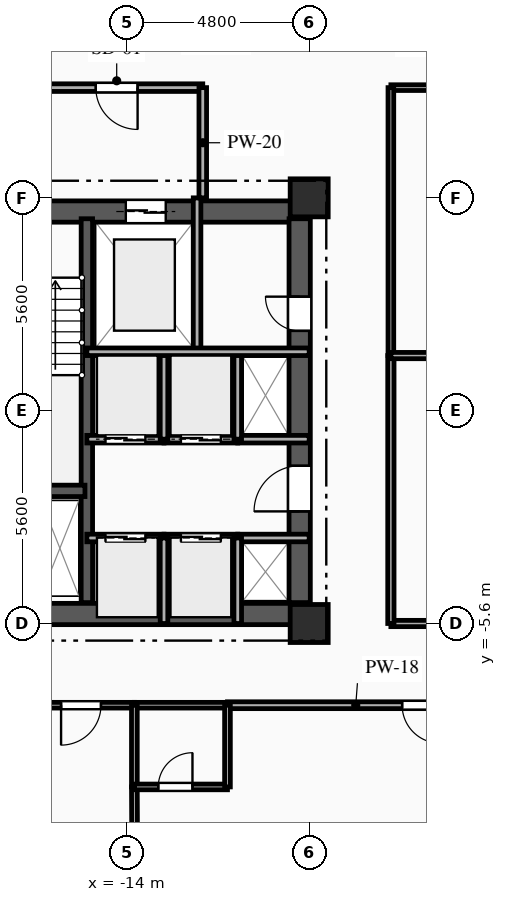
"""IFC4 building model, lengths in metres.
Left out: names, types, materials, properties, quantities, classifications, styles, units other than length and angle.
Written with IfcOpenShell. Run it as: python <this file> out.ifc"""

import sys

from ifc_helpers import new_model, si_unit, direction, frame, frame_2d, origin, origin_2d, place, context, subcontext, project, spatial, rectangle, extrude, element, fill, save


model = new_model("IFC4")
c1 = context("Model", 3, precision=1e-05, world=origin(), true_north=direction((0.0, 1.0)))
c2 = subcontext(c1, "Body", "Model", "MODEL_VIEW")
j1 = project(units=[si_unit("LENGTHUNIT", "METRE"), si_unit("PLANEANGLEUNIT", "RADIAN")], contexts=[c1])
p1 = place(None, origin())
s1 = spatial("IfcSite", under=j1, at=p1, CompositionType="ELEMENT")
p2 = place(p1, origin())
s2 = spatial("IfcBuilding", under=s1, at=p2, CompositionType="ELEMENT")
p3 = place(p2, frame((0.0, 0.0, 79.0)))
s3 = spatial("IfcBuildingStorey", under=s2, at=p3, CompositionType="ELEMENT", Elevation=79.0)
for number, where, z_axis, x_axis in (
    (1, (-9.2, -5.6, 0.0), (0.0, 0.0, 1.0), (1.0, 0.0, 0.0)),
    (2, (-9.2, 5.6, 0.0), (0.0, 0.0, 1.0), (1.0, 0.0, 0.0)),
):
    element("IfcColumn", number, at=place(p3, frame(where, z_axis=z_axis, x_axis=x_axis)), inside=s3, PredefinedType="COLUMN", context=c2, shape_type="SweptSolid", body=[
        extrude(rectangle(XDim=1.0, YDim=1.0, at=origin_2d()), origin(), (0.0, 0.0, 1.0), 3.35),
    ])
p4 = place(p3, frame((-18.8, 5.24, 0.0), z_axis=(0.0, 0.0, 1.0), x_axis=(1.0, 0.0, 0.0)))
e3 = element("IfcWall", 3, at=p4, inside=s3, PredefinedType="SHEAR", context=c2, shape_type="SweptSolid", body=[
    extrude(rectangle(XDim=9.6, YDim=0.56, at=frame_2d((4.8, 0.0))), origin(), (0.0, 0.0, 1.0), 3.045),
])
p5 = place(p4, frame((1.55, 0.0, 0.0)))
e4 = element("IfcOpeningElement", 4, at=p5, cuts=e3, PredefinedType="OPENING", context=c2, shape_type="SweptSolid", body=[
    extrude(rectangle(XDim=1.1, YDim=2.15, at=frame_2d((0.55, 1.075))), frame((0.0, 0.29, 0.0), z_axis=(0.0, -1.0, 0.0), x_axis=(1.0, 0.0, 0.0)), (0.0, 0.0, 1.0), 0.58),
])
p6 = place(p4, frame((4.775, 0.0, 0.0)))
e5 = element("IfcOpeningElement", 5, at=p6, cuts=e3, PredefinedType="OPENING", context=c2, shape_type="SweptSolid", body=[
    extrude(rectangle(XDim=1.05, YDim=2.1, at=frame_2d((0.525, 1.05))), frame((0.0, 0.29, 0.0), z_axis=(0.0, -1.0, 0.0), x_axis=(1.0, 0.0, 0.0)), (0.0, 0.0, 1.0), 0.58),
])
p7 = place(p3, frame((-18.8, -5.35, 0.0), z_axis=(0.0, 0.0, 1.0), x_axis=(1.0, 0.0, 0.0)))
e6 = element("IfcWall", 6, at=p7, inside=s3, PredefinedType="SHEAR", context=c2, shape_type="SweptSolid", body=[
    extrude(rectangle(XDim=9.6, YDim=0.56, at=frame_2d((4.8, 0.0))), origin(), (0.0, 0.0, 1.0), 3.045),
])
p8 = place(p7, frame((1.05, 0.0, 0.0)))
e7 = element("IfcOpeningElement", 7, at=p8, cuts=e6, PredefinedType="OPENING", context=c2, shape_type="SweptSolid", body=[
    extrude(rectangle(XDim=0.9, YDim=2.1, at=frame_2d((0.45, 1.05))), frame((0.0, 0.29, 0.0), z_axis=(0.0, -1.0, 0.0), x_axis=(1.0, 0.0, 0.0)), (0.0, 0.0, 1.0), 0.58),
])
p9 = place(p3, frame((-9.45, -5.05, 0.0), z_axis=(0.0, 0.0, 1.0), x_axis=(0.0, 1.0, 0.0)))
e8 = element("IfcWall", 8, at=p9, inside=s3, PredefinedType="SHEAR", context=c2, shape_type="SweptSolid", body=[
    extrude(rectangle(XDim=10.1, YDim=0.56, at=frame_2d((5.05, 0.0))), origin(), (0.0, 0.0, 1.0), 3.045),
])
p10 = place(p9, frame((7.15, 0.0, 0.0)))
e9 = element("IfcOpeningElement", 9, at=p10, cuts=e8, PredefinedType="OPENING", context=c2, shape_type="SweptSolid", body=[
    extrude(rectangle(XDim=0.9, YDim=2.1, at=frame_2d((0.45, 1.05))), frame((0.0, 0.29, 0.0), z_axis=(0.0, -1.0, 0.0), x_axis=(1.0, 0.0, 0.0)), (0.0, 0.0, 1.0), 0.58),
])
p11 = place(p9, frame((2.4, 0.0, 0.0)))
e10 = element("IfcOpeningElement", 10, at=p11, cuts=e8, PredefinedType="OPENING", context=c2, shape_type="SweptSolid", body=[
    extrude(rectangle(XDim=1.2, YDim=2.15, at=frame_2d((0.6, 1.075))), frame((0.0, 0.29, 0.0), z_axis=(0.0, -1.0, 0.0), x_axis=(1.0, 0.0, 0.0)), (0.0, 0.0, 1.0), 0.58),
])
p12 = place(p3, frame((-15.05, -5.05, 0.0), z_axis=(0.0, 0.0, 1.0), x_axis=(0.0, 1.0, 0.0)))
e11 = element("IfcWall", 11, at=p12, inside=s3, PredefinedType="SHEAR", context=c2, shape_type="SweptSolid", body=[
    extrude(rectangle(XDim=10.1, YDim=0.3, at=frame_2d((5.05, 0.0))), origin(), (0.0, 0.0, 1.0), 3.045),
])
p13 = place(p3, frame((-18.28, -2.11, 0.0), z_axis=(0.0, 0.0, 1.0), x_axis=(1.0, 0.0, 0.0)))
e12 = element("IfcWall", 12, at=p13, inside=s3, PredefinedType="SHEAR", context=c2, shape_type="SweptSolid", body=[
    extrude(rectangle(XDim=3.18, YDim=0.3, at=frame_2d((1.59, 0.0))), origin(), (0.0, 0.0, 1.0), 3.045),
])
p14 = place(p3, frame((-12.15, 1.55, 0.0), z_axis=(0.0, 0.0, 1.0), x_axis=(0.0, 1.0, 0.0)))
e13 = element("IfcWall", 13, at=p14, inside=s3, PredefinedType="PARTITIONING", context=c2, shape_type="SweptSolid", body=[
    extrude(rectangle(XDim=4.05, YDim=0.2, at=frame_2d((2.025, 0.0))), origin(), (0.0, 0.0, 1.0), 3.045),
])
p15 = place(p3, frame((-12.0, 8.5, 0.0), z_axis=(0.0, 0.0, 1.0), x_axis=(-1.0, 0.0, 0.0)))
e14 = element("IfcWall", 14, at=p15, inside=s3, PredefinedType="PARTITIONING", context=c2, shape_type="SweptSolid", body=[
    extrude(rectangle(XDim=6.8, YDim=0.2, at=frame_2d((3.4, 0.0))), origin(), (0.0, 0.0, 1.0), 3.045),
])
p16 = place(p15, frame((1.715, 0.0, 0.0)))
e15 = element("IfcOpeningElement", 15, at=p16, cuts=e14, PredefinedType="OPENING", context=c2, shape_type="SweptSolid", body=[
    extrude(rectangle(XDim=1.1, YDim=2.15, at=frame_2d((0.55, 1.075))), frame((0.0, 0.11, 0.0), z_axis=(0.0, -1.0, 0.0), x_axis=(1.0, 0.0, 0.0)), (0.0, 0.0, 1.0), 0.22),
])
p17 = place(p3, frame((-12.0, 5.6, 0.0), z_axis=(0.0, 0.0, 1.0), x_axis=(0.0, 1.0, 0.0)))
e16 = element("IfcWall", 16, at=p17, inside=s3, PredefinedType="PARTITIONING", context=c2, shape_type="SweptSolid", body=[
    extrude(rectangle(XDim=2.9, YDim=0.2, at=frame_2d((1.45, 0.0))), origin(), (0.0, 0.0, 1.0), 3.045),
])
p18 = place(p3, frame((-15.05, -3.35, 0.0), z_axis=(0.0, 0.0, 1.0), x_axis=(1.0, 0.0, 0.0)))
e17 = element("IfcWall", 17, at=p18, inside=s3, PredefinedType="PARTITIONING", context=c2, shape_type="SweptSolid", body=[
    extrude(rectangle(XDim=2.03, YDim=0.2, at=frame_2d((1.015, 0.0))), origin(), (0.0, 0.0, 1.0), 3.045),
])
p19 = place(p18, frame((0.49, 0.0, 0.0)))
e18 = element("IfcOpeningElement", 18, at=p19, cuts=e17, PredefinedType="OPENING", context=c2, shape_type="SweptSolid", body=[
    extrude(rectangle(XDim=1.05, YDim=2.1, at=frame_2d((0.525, 1.05))), frame((0.0, 0.11, 0.0), z_axis=(0.0, -1.0, 0.0), x_axis=(1.0, 0.0, 0.0)), (0.0, 0.0, 1.0), 0.22),
])
p20 = place(p3, frame((-13.02, -3.35, 0.0), z_axis=(0.0, 0.0, 1.0), x_axis=(1.0, 0.0, 0.0)))
e19 = element("IfcWall", 19, at=p20, inside=s3, PredefinedType="PARTITIONING", context=c2, shape_type="SweptSolid", body=[
    extrude(rectangle(XDim=1.94, YDim=0.2, at=frame_2d((0.97, 0.0))), origin(), (0.0, 0.0, 1.0), 3.045),
])
p21 = place(p20, frame((0.445, 0.0, 0.0)))
e20 = element("IfcOpeningElement", 20, at=p21, cuts=e19, PredefinedType="OPENING", context=c2, shape_type="SweptSolid", body=[
    extrude(rectangle(XDim=1.05, YDim=2.1, at=frame_2d((0.525, 1.05))), frame((0.0, 0.11, 0.0), z_axis=(0.0, -1.0, 0.0), x_axis=(1.0, 0.0, 0.0)), (0.0, 0.0, 1.0), 0.22),
])
p22 = place(p3, frame((-11.08, -3.35, 0.0), z_axis=(0.0, 0.0, 1.0), x_axis=(1.0, 0.0, 0.0)))
e21 = element("IfcWall", 21, at=p22, inside=s3, PredefinedType="PARTITIONING", context=c2, shape_type="SweptSolid", body=[
    extrude(rectangle(XDim=1.88, YDim=0.2, at=frame_2d((0.94, 0.0))), origin(), (0.0, 0.0, 1.0), 2.76),
])
p23 = place(p3, frame((-13.02, -0.75, 0.0), z_axis=(0.0, 0.0, 1.0), x_axis=(-1.0, 0.0, 0.0)))
e22 = element("IfcWall", 22, at=p23, inside=s3, PredefinedType="PARTITIONING", context=c2, shape_type="SweptSolid", body=[
    extrude(rectangle(XDim=2.03, YDim=0.2, at=frame_2d((1.015, 0.0))), origin(), (0.0, 0.0, 1.0), 3.045),
])
p24 = place(p23, frame((0.49, 0.0, 0.0)))
e23 = element("IfcOpeningElement", 23, at=p24, cuts=e22, PredefinedType="OPENING", context=c2, shape_type="SweptSolid", body=[
    extrude(rectangle(XDim=1.05, YDim=2.1, at=frame_2d((0.525, 1.05))), frame((0.0, 0.11, 0.0), z_axis=(0.0, -1.0, 0.0), x_axis=(1.0, 0.0, 0.0)), (0.0, 0.0, 1.0), 0.22),
])
p25 = place(p3, frame((-11.08, -0.75, 0.0), z_axis=(0.0, 0.0, 1.0), x_axis=(-1.0, 0.0, 0.0)))
e24 = element("IfcWall", 24, at=p25, inside=s3, PredefinedType="PARTITIONING", context=c2, shape_type="SweptSolid", body=[
    extrude(rectangle(XDim=1.94, YDim=0.2, at=frame_2d((0.97, 0.0))), origin(), (0.0, 0.0, 1.0), 3.045),
])
p26 = place(p25, frame((0.445, 0.0, 0.0)))
e25 = element("IfcOpeningElement", 25, at=p26, cuts=e24, PredefinedType="OPENING", context=c2, shape_type="SweptSolid", body=[
    extrude(rectangle(XDim=1.05, YDim=2.1, at=frame_2d((0.525, 1.05))), frame((0.0, 0.11, 0.0), z_axis=(0.0, -1.0, 0.0), x_axis=(1.0, 0.0, 0.0)), (0.0, 0.0, 1.0), 0.22),
])
p27 = place(p3, frame((-9.2, -0.75, 0.0), z_axis=(0.0, 0.0, 1.0), x_axis=(-1.0, 0.0, 0.0)))
e26 = element("IfcWall", 26, at=p27, inside=s3, PredefinedType="PARTITIONING", context=c2, shape_type="SweptSolid", body=[
    extrude(rectangle(XDim=1.88, YDim=0.2, at=frame_2d((0.94, 0.0))), origin(), (0.0, 0.0, 1.0), 3.045),
])
for number, where, z_axis, x_axis in (
    (27, (-13.02, -5.6, 0.0), (0.0, 0.0, 1.0), (0.0, 1.0, 0.0)),
    (28, (-11.08, -5.6, 0.0), (0.0, 0.0, 1.0), (0.0, 1.0, 0.0)),
):
    element("IfcWall", number, at=place(p3, frame(where, z_axis=z_axis, x_axis=x_axis)), inside=s3, PredefinedType="PARTITIONING", context=c2, shape_type="SweptSolid", body=[
        extrude(rectangle(XDim=2.25, YDim=0.2, at=frame_2d((1.125, 0.0))), origin(), (0.0, 0.0, 1.0), 3.045),
    ])
for number, where, z_axis, x_axis in (
    (29, (-13.02, -0.75, 0.0), (0.0, 0.0, 1.0), (0.0, 1.0, 0.0)),
    (30, (-11.08, -0.75, 0.0), (0.0, 0.0, 1.0), (0.0, 1.0, 0.0)),
):
    element("IfcWall", number, at=place(p3, frame(where, z_axis=z_axis, x_axis=x_axis)), inside=s3, PredefinedType="PARTITIONING", context=c2, shape_type="SweptSolid", body=[
        extrude(rectangle(XDim=2.3, YDim=0.2, at=frame_2d((1.15, 0.0))), origin(), (0.0, 0.0, 1.0), 3.045),
    ])
p28 = place(p3, frame((0.0, 8.5, 0.0), z_axis=(0.0, 0.0, 1.0), x_axis=(-1.0, 0.0, 0.0)))
e31 = element("IfcWall", 31, at=p28, inside=s3, PredefinedType="PARTITIONING", context=c2, shape_type="SweptSolid", body=[
    extrude(rectangle(XDim=7.05, YDim=0.15, at=frame_2d((3.525, 0.0))), origin(), (0.0, 0.0, 1.0), 3.045),
])
p29 = place(p28, frame((1.185, 0.0, 0.0)))
e32 = element("IfcOpeningElement", 32, at=p29, cuts=e31, PredefinedType="OPENING", context=c2, shape_type="SweptSolid", body=[
    extrude(rectangle(XDim=1.05, YDim=2.15, at=frame_2d((0.525, 1.075))), frame((0.0, 0.085, 0.0), z_axis=(0.0, -1.0, 0.0), x_axis=(1.0, 0.0, 0.0)), (0.0, 0.0, 1.0), 0.17),
])
p30 = place(p3, frame((-13.8, -7.75, 0.0), z_axis=(0.0, 0.0, 1.0), x_axis=(-1.0, 0.0, 0.0)))
e33 = element("IfcWall", 33, at=p30, inside=s3, PredefinedType="PARTITIONING", context=c2, shape_type="SweptSolid", body=[
    extrude(rectangle(XDim=4.6, YDim=0.15, at=frame_2d((2.3, 0.0))), origin(), (0.0, 0.0, 1.0), 3.045),
])
p31 = place(p30, frame((0.879, 0.0, 0.0)))
e34 = element("IfcOpeningElement", 34, at=p31, cuts=e33, PredefinedType="OPENING", context=c2, shape_type="SweptSolid", body=[
    extrude(rectangle(XDim=1.05, YDim=2.15, at=frame_2d((0.525, 1.075))), frame((0.0, 0.085, 0.0), z_axis=(0.0, -1.0, 0.0), x_axis=(1.0, 0.0, 0.0)), (0.0, 0.0, 1.0), 0.17),
])
p32 = place(p3, frame((-4.6, -7.75, 0.0), z_axis=(0.0, 0.0, 1.0), x_axis=(-1.0, 0.0, 0.0)))
e35 = element("IfcWall", 35, at=p32, inside=s3, PredefinedType="PARTITIONING", context=c2, shape_type="SweptSolid", body=[
    extrude(rectangle(XDim=6.75, YDim=0.18, at=frame_2d((3.375, 0.0))), origin(), (0.0, 0.0, 1.0), 3.045),
])
p33 = place(p32, frame((1.154, 0.0, 0.0)))
e36 = element("IfcOpeningElement", 36, at=p33, cuts=e35, PredefinedType="OPENING", context=c2, shape_type="SweptSolid", body=[
    extrude(rectangle(XDim=1.0, YDim=2.15, at=frame_2d((0.5, 1.075))), frame((0.0, 0.1, 0.0), z_axis=(0.0, -1.0, 0.0), x_axis=(1.0, 0.0, 0.0)), (0.0, 0.0, 1.0), 0.2),
])
p34 = place(p3, frame((-11.35, -7.75, 0.0), z_axis=(0.0, 0.0, 1.0), x_axis=(-1.0, 0.0, 0.0)))
e37 = element("IfcWall", 37, at=p34, inside=s3, PredefinedType="PLUMBINGWALL", context=c2, shape_type="SweptSolid", body=[
    extrude(rectangle(XDim=2.45, YDim=0.15, at=frame_2d((1.225, 0.0))), origin(), (0.0, 0.0, 1.0), 3.045),
])
p35 = place(p3, frame((-7.05, -5.6, 0.0), z_axis=(0.0, 0.0, 1.0), x_axis=(1.0, 0.0, 0.0)))
e38 = element("IfcWall", 38, at=p35, inside=s3, PredefinedType="PARTITIONING", context=c2, shape_type="SweptSolid", body=[
    extrude(rectangle(XDim=7.05, YDim=0.165, at=frame_2d((3.525, 0.0))), origin(), (0.0, 0.0, 1.0), 2.53),
])
p36 = place(p35, frame((4.728, 0.0, 0.0)))
e39 = element("IfcOpeningElement", 39, at=p36, cuts=e38, PredefinedType="OPENING", context=c2, shape_type="SweptSolid", body=[
    extrude(rectangle(XDim=1.15, YDim=2.15, at=frame_2d((0.575, 1.075))), frame((0.0, 0.093, 0.0), z_axis=(0.0, -1.0, 0.0), x_axis=(1.0, 0.0, 0.0)), (0.0, 0.0, 1.0), 0.185),
])
p37 = place(p3, frame((-7.05, 1.45, 0.0), z_axis=(0.0, 0.0, 1.0), x_axis=(0.0, -1.0, 0.0)))
e40 = element("IfcWall", 40, at=p37, inside=s3, PredefinedType="PARTITIONING", context=c2, shape_type="SweptSolid", body=[
    extrude(rectangle(XDim=7.05, YDim=0.165, at=frame_2d((3.525, 0.0))), origin(), (0.0, 0.0, 1.0), 3.045),
])
p38 = place(p3, frame((-7.05, 8.5, 0.0), z_axis=(0.0, 0.0, 1.0), x_axis=(0.0, -1.0, 0.0)))
e41 = element("IfcWall", 41, at=p38, inside=s3, PredefinedType="PARTITIONING", context=c2, shape_type="SweptSolid", body=[
    extrude(rectangle(XDim=7.05, YDim=0.15, at=frame_2d((3.525, 0.0))), origin(), (0.0, 0.0, 1.0), 3.045),
])
p39 = place(p3, frame((-13.8, -9.9, 0.0), z_axis=(0.0, 0.0, 1.0), x_axis=(0.00504124668, -0.999987292835, 0.0)))
e42 = element("IfcWall", 42, at=p39, inside=s3, PredefinedType="PARTITIONING", context=c2, shape_type="SweptSolid", body=[
    extrude(rectangle(XDim=8.717, YDim=0.15, at=frame_2d((4.358, 0.0))), origin(), (0.0, 0.0, 1.0), 3.045),
])
p40 = place(p3, frame((-13.8, -7.75, 0.0), z_axis=(0.0, 0.0, 1.0), x_axis=(0.0, -1.0, 0.0)))
e43 = element("IfcWall", 43, at=p40, inside=s3, PredefinedType="PLUMBINGWALL", context=c2, shape_type="SweptSolid", body=[
    extrude(rectangle(XDim=2.15, YDim=0.15, at=frame_2d((1.075, 0.0))), origin(), (0.0, 0.0, 1.0), 3.045),
])
p41 = place(p3, frame((-13.8, -9.9, 0.0), z_axis=(0.0, 0.0, 1.0), x_axis=(1.0, 0.0, 0.0)))
e44 = element("IfcWall", 44, at=p41, inside=s3, PredefinedType="PLUMBINGWALL", context=c2, shape_type="SweptSolid", body=[
    extrude(rectangle(XDim=2.45, YDim=0.15, at=frame_2d((1.225, 0.0))), origin(), (0.0, 0.0, 1.0), 3.045),
])
p42 = place(p41, frame((0.629, 0.0, 0.0)))
e45 = element("IfcOpeningElement", 45, at=p42, cuts=e44, PredefinedType="OPENING", context=c2, shape_type="SweptSolid", body=[
    extrude(rectangle(XDim=0.9, YDim=2.1, at=frame_2d((0.45, 1.05))), frame((0.0, 0.085, 0.0), z_axis=(0.0, -1.0, 0.0), x_axis=(1.0, 0.0, 0.0)), (0.0, 0.0, 1.0), 0.17),
])
p43 = place(p3, frame((-11.35, -9.9, 0.0), z_axis=(0.0, 0.0, 1.0), x_axis=(0.0, 1.0, 0.0)))
e46 = element("IfcWall", 46, at=p43, inside=s3, PredefinedType="PLUMBINGWALL", context=c2, shape_type="SweptSolid", body=[
    extrude(rectangle(XDim=2.15, YDim=0.15, at=frame_2d((1.075, 0.0))), origin(), (0.0, 0.0, 1.0), 3.045),
])
p44 = place(p3, frame((-7.05, 1.45, 0.0), z_axis=(0.0, 0.0, 1.0), x_axis=(1.0, 0.0, 0.0)))
e47 = element("IfcWall", 47, at=p44, inside=s3, PredefinedType="PARTITIONING", context=c2, shape_type="SweptSolid", body=[
    extrude(rectangle(XDim=14.1, YDim=0.165, at=frame_2d((7.05, 0.0))), origin(), (0.0, 0.0, 1.0), 3.045),
])
p45 = place(p3, frame((-15.05, 1.55, 0.0), z_axis=(0.0, 0.0, 1.0), x_axis=(1.0, 0.0, 0.0)))
e48 = element("IfcWall", 48, at=p45, inside=s3, PredefinedType="PARTITIONING", context=c2, shape_type="SweptSolid", body=[
    extrude(rectangle(XDim=5.85, YDim=0.2, at=frame_2d((2.925, 0.0))), origin(), (0.0, 0.0, 1.0), 3.045),
])
p46 = place(p6, origin())
e49 = element("IfcDoor", 49, at=p46, inside=s3, OperationType="DOUBLE_DOOR_SLIDING", PredefinedType="DOOR", context=c2, shape_type="SweptSolid", body=[
    extrude(rectangle(XDim=1.05, YDim=2.1, at=frame_2d((0.525, 1.05))), frame((0.0, 0.025, 0.0), z_axis=(0.0, -1.0, 0.0), x_axis=(1.0, 0.0, 0.0)), (0.0, 0.0, 1.0), 0.05),
])
fill(e5, e49)
p47 = place(p16, origin())
e50 = element("IfcDoor", 50, at=p47, inside=s3, OperationType="SINGLE_SWING_LEFT", PredefinedType="DOOR", context=c2, shape_type="SweptSolid", body=[
    extrude(rectangle(XDim=1.1, YDim=2.15, at=frame_2d((0.55, 1.075))), frame((0.0, 0.025, 0.0), z_axis=(0.0, -1.0, 0.0), x_axis=(1.0, 0.0, 0.0)), (0.0, 0.0, 1.0), 0.05),
])
fill(e15, e50)
p48 = place(p10, origin())
e51 = element("IfcDoor", 51, at=p48, inside=s3, OperationType="SINGLE_SWING_RIGHT", PredefinedType="DOOR", context=c2, shape_type="SweptSolid", body=[
    extrude(rectangle(XDim=0.9, YDim=2.1, at=frame_2d((0.45, 1.05))), frame((0.0, 0.025, 0.0), z_axis=(0.0, -1.0, 0.0), x_axis=(1.0, 0.0, 0.0)), (0.0, 0.0, 1.0), 0.05),
])
fill(e9, e51)
p49 = place(p19, origin())
e52 = element("IfcDoor", 52, at=p49, inside=s3, OperationType="DOUBLE_DOOR_SLIDING", PredefinedType="DOOR", context=c2, shape_type="SweptSolid", body=[
    extrude(rectangle(XDim=1.05, YDim=2.1, at=frame_2d((0.525, 1.05))), frame((0.0, 0.025, 0.0), z_axis=(0.0, -1.0, 0.0), x_axis=(1.0, 0.0, 0.0)), (0.0, 0.0, 1.0), 0.05),
])
fill(e18, e52)
p50 = place(p21, origin())
e53 = element("IfcDoor", 53, at=p50, inside=s3, OperationType="DOUBLE_DOOR_SLIDING", PredefinedType="DOOR", context=c2, shape_type="SweptSolid", body=[
    extrude(rectangle(XDim=1.05, YDim=2.1, at=frame_2d((0.525, 1.05))), frame((0.0, 0.025, 0.0), z_axis=(0.0, -1.0, 0.0), x_axis=(1.0, 0.0, 0.0)), (0.0, 0.0, 1.0), 0.05),
])
fill(e20, e53)
p51 = place(p24, origin())
e54 = element("IfcDoor", 54, at=p51, inside=s3, OperationType="DOUBLE_DOOR_SLIDING", PredefinedType="DOOR", context=c2, shape_type="SweptSolid", body=[
    extrude(rectangle(XDim=1.05, YDim=2.1, at=frame_2d((0.525, 1.05))), frame((0.0, 0.025, 0.0), z_axis=(0.0, -1.0, 0.0), x_axis=(1.0, 0.0, 0.0)), (0.0, 0.0, 1.0), 0.05),
])
fill(e23, e54)
p52 = place(p26, origin())
e55 = element("IfcDoor", 55, at=p52, inside=s3, OperationType="DOUBLE_DOOR_SLIDING", PredefinedType="DOOR", context=c2, shape_type="SweptSolid", body=[
    extrude(rectangle(XDim=1.05, YDim=2.1, at=frame_2d((0.525, 1.05))), frame((0.0, 0.025, 0.0), z_axis=(0.0, -1.0, 0.0), x_axis=(1.0, 0.0, 0.0)), (0.0, 0.0, 1.0), 0.05),
])
fill(e25, e55)
p53 = place(p11, origin())
e56 = element("IfcDoor", 56, at=p53, inside=s3, OperationType="SINGLE_SWING_LEFT", PredefinedType="DOOR", context=c2, shape_type="SweptSolid", body=[
    extrude(rectangle(XDim=1.2, YDim=2.15, at=frame_2d((0.6, 1.075))), frame((0.0, 0.025, 0.0), z_axis=(0.0, -1.0, 0.0), x_axis=(1.0, 0.0, 0.0)), (0.0, 0.0, 1.0), 0.05),
])
fill(e10, e56)
p54 = place(p31, origin())
e57 = element("IfcDoor", 57, at=p54, inside=s3, OperationType="SINGLE_SWING_RIGHT", PredefinedType="DOOR", context=c2, shape_type="SweptSolid", body=[
    extrude(rectangle(XDim=1.05, YDim=2.15, at=frame_2d((0.525, 1.075))), frame((0.0, 0.025, 0.0), z_axis=(0.0, -1.0, 0.0), x_axis=(1.0, 0.0, 0.0)), (0.0, 0.0, 1.0), 0.05),
])
fill(e34, e57)
p55 = place(p33, origin())
e58 = element("IfcDoor", 58, at=p55, inside=s3, OperationType="SINGLE_SWING_LEFT", PredefinedType="DOOR", context=c2, shape_type="SweptSolid", body=[
    extrude(rectangle(XDim=1.0, YDim=2.15, at=frame_2d((0.5, 1.075))), frame((0.0, 0.025, 0.0), z_axis=(0.0, -1.0, 0.0), x_axis=(1.0, 0.0, 0.0)), (0.0, 0.0, 1.0), 0.05),
])
fill(e36, e58)
p56 = place(p42, origin())
e59 = element("IfcDoor", 59, at=p56, inside=s3, OperationType="SINGLE_SWING_RIGHT", PredefinedType="DOOR", context=c2, shape_type="SweptSolid", body=[
    extrude(rectangle(XDim=0.9, YDim=2.1, at=frame_2d((0.45, 1.05))), frame((0.0, 0.025, 0.0), z_axis=(0.0, -1.0, 0.0), x_axis=(1.0, 0.0, 0.0)), (0.0, 0.0, 1.0), 0.05),
])
fill(e45, e59)
save(model, sys.argv[1])
